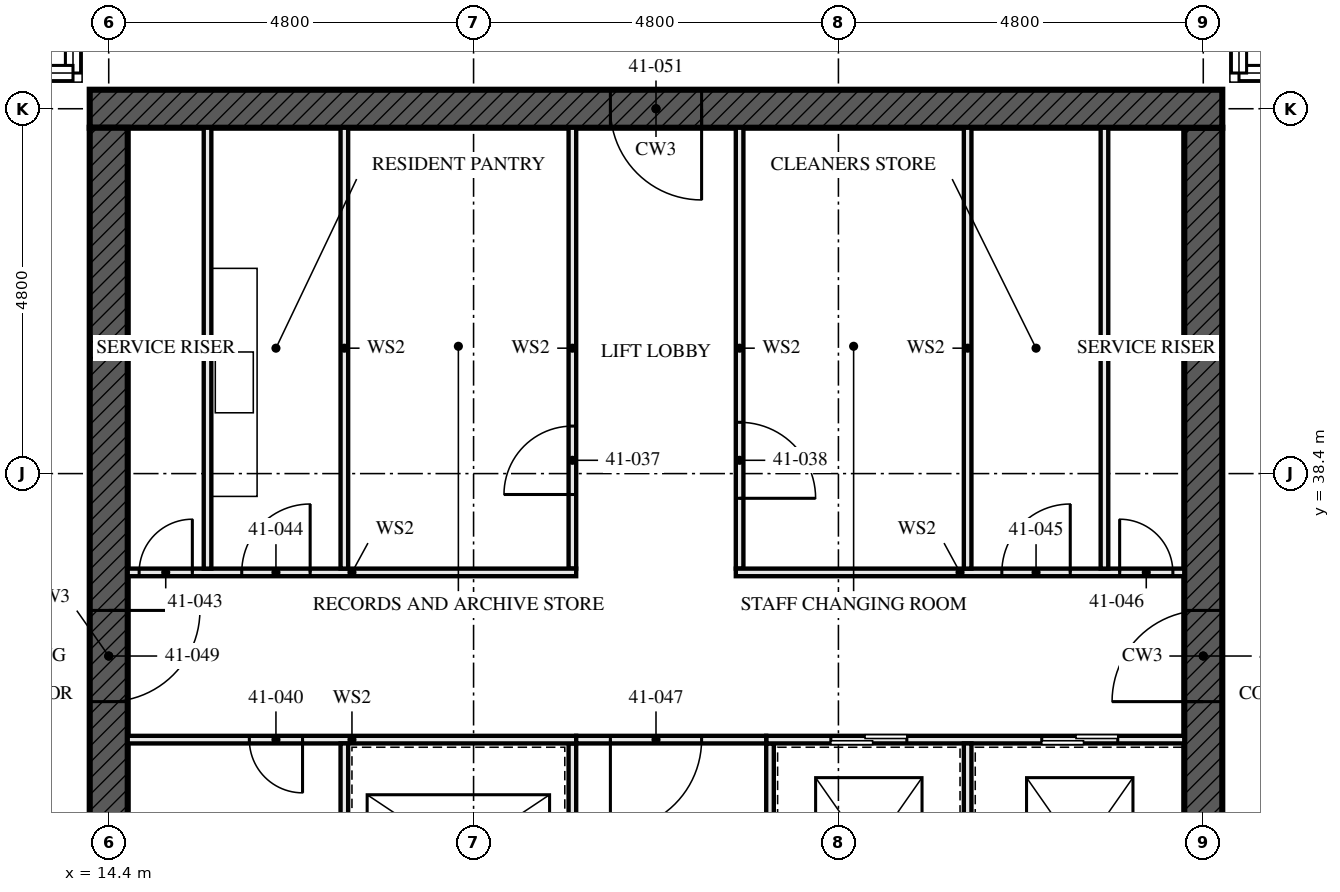
"""IFC4 building model, lengths in metres.
Left out: names, types, materials, properties, quantities, classifications, styles, units other than length and angle.
Written with IfcOpenShell. Run it as: python <this file> out.ifc"""

import sys

from ifc_helpers import new_model, si_unit, direction, frame, frame_2d, origin, place, context, subcontext, project, spatial, rectangle, extrude, element, fill, save


model = new_model("IFC4")
c1 = context("Model", 3, precision=1e-05, world=origin(), true_north=direction((0.0, 1.0)))
c2 = subcontext(c1, "Body", "Model", "MODEL_VIEW")
j1 = project(units=[si_unit("LENGTHUNIT", "METRE"), si_unit("PLANEANGLEUNIT", "RADIAN")], contexts=[c1])
p1 = place(None, origin())
s1 = spatial("IfcSite", under=j1, at=p1, CompositionType="ELEMENT")
p2 = place(p1, origin())
s2 = spatial("IfcBuilding", under=s1, at=p2, CompositionType="ELEMENT")
p3 = place(p2, frame((0.0, 0.0, 151.5)))
s3 = spatial("IfcBuildingStorey", under=s2, at=p3, CompositionType="ELEMENT", Elevation=151.5)
p4 = place(p3, frame((29.05, 43.2, -0.17), z_axis=(0.0, 0.0, 1.0), x_axis=(-1.0, 0.0, 0.0)))
e1 = element("IfcWall", 1, at=p4, inside=s3, PredefinedType="SHEAR", context=c2, shape_type="SweptSolid", body=[
    extrude(rectangle(XDim=14.9, YDim=0.5, at=frame_2d((7.45, 0.0))), origin(), (0.0, 0.0, 1.0), 3.5),
])
p5 = place(p4, frame((6.85, 0.0, 0.17)))
e2 = element("IfcOpeningElement", 2, at=p5, cuts=e1, PredefinedType="OPENING", context=c2, shape_type="SweptSolid", body=[
    extrude(rectangle(XDim=1.2, YDim=2.1, at=frame_2d((0.6, 1.05))), frame((0.0, 0.26, 0.0), z_axis=(0.0, -1.0, 0.0), x_axis=(1.0, 0.0, 0.0)), (0.0, 0.0, 1.0), 0.521),
])
p6 = place(p3, frame((14.4, 42.95, -0.17), z_axis=(0.0, 0.0, 1.0), x_axis=(0.0, -1.0, 0.0)))
e3 = element("IfcWall", 3, at=p6, inside=s3, PredefinedType="SHEAR", context=c2, shape_type="SweptSolid", body=[
    extrude(rectangle(XDim=13.9, YDim=0.5, at=frame_2d((6.95, 0.0))), origin(), (0.0, 0.0, 1.0), 3.5),
])
p7 = place(p6, frame((6.35, 0.0, 0.17)))
e4 = element("IfcOpeningElement", 4, at=p7, cuts=e3, PredefinedType="OPENING", context=c2, shape_type="SweptSolid", body=[
    extrude(rectangle(XDim=1.2, YDim=2.1, at=frame_2d((0.6, 1.05))), frame((0.0, 0.26, 0.0), z_axis=(0.0, -1.0, 0.0), x_axis=(1.0, 0.0, 0.0)), (0.0, 0.0, 1.0), 0.521),
])
p8 = place(p3, frame((28.8, 29.05, -0.17), z_axis=(0.0, 0.0, 1.0), x_axis=(0.0, 1.0, 0.0)))
e5 = element("IfcWall", 5, at=p8, inside=s3, PredefinedType="SHEAR", context=c2, shape_type="SweptSolid", body=[
    extrude(rectangle(XDim=13.9, YDim=0.5, at=frame_2d((6.95, 0.0))), origin(), (0.0, 0.0, 1.0), 3.5),
])
p9 = place(p8, frame((6.35, 0.0, 0.17)))
e6 = element("IfcOpeningElement", 6, at=p9, cuts=e5, PredefinedType="OPENING", context=c2, shape_type="SweptSolid", body=[
    extrude(rectangle(XDim=1.2, YDim=2.1, at=frame_2d((0.6, 1.05))), frame((0.0, 0.26, 0.0), z_axis=(0.0, -1.0, 0.0), x_axis=(1.0, 0.0, 0.0)), (0.0, 0.0, 1.0), 0.521),
])
for number, where, z_axis, x_axis in (
    (7, (15.7, 37.15, 0.0), (0.0, 0.0, 1.0), (0.0, 1.0, 0.0)),
    (8, (27.5, 37.15, 0.0), (0.0, 0.0, 1.0), (0.0, 1.0, 0.0)),
):
    element("IfcWall", number, at=place(p3, frame(where, z_axis=z_axis, x_axis=x_axis)), inside=s3, PredefinedType="SOLIDWALL", context=c2, shape_type="SweptSolid", body=[
        extrude(rectangle(XDim=5.8, YDim=0.1, at=frame_2d((2.9, 0.0))), origin(), (0.0, 0.0, 1.0), 3.33),
    ])
p10 = place(p3, frame((20.5, 29.05, 0.0), z_axis=(0.0, 0.0, 1.0), x_axis=(0.0, 1.0, 0.0)))
e9 = element("IfcWall", 9, at=p10, inside=s3, PredefinedType="SOLIDWALL", context=c2, shape_type="SweptSolid", body=[
    extrude(rectangle(XDim=5.8, YDim=0.1, at=frame_2d((2.9, 0.0))), origin(), (0.0, 0.0, 1.0), 3.33),
])
p11 = place(p10, frame((0.8, 0.0, 0.0)))
e10 = element("IfcOpeningElement", 10, at=p11, cuts=e9, PredefinedType="OPENING", context=c2, shape_type="SweptSolid", body=[
    extrude(rectangle(XDim=1.1, YDim=2.3, at=frame_2d((0.55, 1.15))), frame((0.0, 0.061, 0.0), z_axis=(0.0, -1.0, 0.0), x_axis=(1.0, 0.0, 0.0)), (0.0, 0.0, 1.0), 0.121),
])
p12 = place(p10, frame((3.775, 0.0, 0.0)))
e11 = element("IfcOpeningElement", 11, at=p12, cuts=e9, PredefinedType="OPENING", context=c2, shape_type="SweptSolid", body=[
    extrude(rectangle(XDim=1.1, YDim=2.3, at=frame_2d((0.55, 1.15))), frame((0.0, 0.061, 0.0), z_axis=(0.0, -1.0, 0.0), x_axis=(1.0, 0.0, 0.0)), (0.0, 0.0, 1.0), 0.121),
])
p13 = place(p3, frame((20.5, 37.15, 0.0), z_axis=(0.0, 0.0, 1.0), x_axis=(0.0, 1.0, 0.0)))
e12 = element("IfcWall", 12, at=p13, inside=s3, PredefinedType="SOLIDWALL", context=c2, shape_type="SweptSolid", body=[
    extrude(rectangle(XDim=5.8, YDim=0.1, at=frame_2d((2.9, 0.0))), origin(), (0.0, 0.0, 1.0), 3.33),
])
p14 = place(p13, frame((0.975, 0.0, 0.0)))
e13 = element("IfcOpeningElement", 13, at=p14, cuts=e12, PredefinedType="OPENING", context=c2, shape_type="SweptSolid", body=[
    extrude(rectangle(XDim=0.9, YDim=2.1, at=frame_2d((0.45, 1.05))), frame((0.0, 0.061, 0.0), z_axis=(0.0, -1.0, 0.0), x_axis=(1.0, 0.0, 0.0)), (0.0, 0.0, 1.0), 0.121),
])
p15 = place(p3, frame((22.7, 37.15, 0.0), z_axis=(0.0, 0.0, 1.0), x_axis=(0.0, 1.0, 0.0)))
e14 = element("IfcWall", 14, at=p15, inside=s3, PredefinedType="SOLIDWALL", context=c2, shape_type="SweptSolid", body=[
    extrude(rectangle(XDim=5.8, YDim=0.1, at=frame_2d((2.9, 0.0))), origin(), (0.0, 0.0, 1.0), 3.33),
])
p16 = place(p15, frame((0.925, 0.0, 0.0)))
e15 = element("IfcOpeningElement", 15, at=p16, cuts=e14, PredefinedType="OPENING", context=c2, shape_type="SweptSolid", body=[
    extrude(rectangle(XDim=1.0, YDim=2.1, at=frame_2d((0.5, 1.05))), frame((0.0, 0.061, 0.0), z_axis=(0.0, -1.0, 0.0), x_axis=(1.0, 0.0, 0.0)), (0.0, 0.0, 1.0), 0.121),
])
p17 = place(p3, frame((23.1, 29.05, 0.0), z_axis=(0.0, 0.0, 1.0), x_axis=(0.0, 1.0, 0.0)))
e16 = element("IfcWall", 16, at=p17, inside=s3, PredefinedType="SOLIDWALL", context=c2, shape_type="SweptSolid", body=[
    extrude(rectangle(XDim=5.8, YDim=0.1, at=frame_2d((2.9, 0.0))), origin(), (0.0, 0.0, 1.0), 3.33),
])
p18 = place(p17, frame((1.0, 0.0, 0.0)))
e17 = element("IfcOpeningElement", 17, at=p18, cuts=e16, PredefinedType="OPENING", context=c2, shape_type="SweptSolid", body=[
    extrude(rectangle(XDim=0.7, YDim=2.1, at=frame_2d((0.35, 1.05))), frame((0.0, 0.061, 0.0), z_axis=(0.0, -1.0, 0.0), x_axis=(1.0, 0.0, 0.0)), (0.0, 0.0, 1.0), 0.121),
])
p19 = place(p3, frame((14.65, 34.9, 0.0), z_axis=(0.0, 0.0, 1.0), x_axis=(1.0, 0.0, 0.0)))
e18 = element("IfcWall", 18, at=p19, inside=s3, PredefinedType="SOLIDWALL", context=c2, shape_type="SweptSolid", body=[
    extrude(rectangle(XDim=5.9, YDim=0.1, at=frame_2d((2.95, 0.0))), origin(), (0.0, 0.0, 1.0), 3.33),
])
p20 = place(p19, frame((1.6, 0.0, 0.0)))
e19 = element("IfcOpeningElement", 19, at=p20, cuts=e18, PredefinedType="OPENING", context=c2, shape_type="SweptSolid", body=[
    extrude(rectangle(XDim=0.7, YDim=2.1, at=frame_2d((0.35, 1.05))), frame((0.0, 0.061, 0.0), z_axis=(0.0, -1.0, 0.0), x_axis=(1.0, 0.0, 0.0)), (0.0, 0.0, 1.0), 0.121),
])
p21 = place(p3, frame((23.05, 34.9, 0.0), z_axis=(0.0, 0.0, 1.0), x_axis=(1.0, 0.0, 0.0)))
e20 = element("IfcWall", 20, at=p21, inside=s3, PredefinedType="SOLIDWALL", context=c2, shape_type="SweptSolid", body=[
    extrude(rectangle(XDim=5.5, YDim=0.1, at=frame_2d((2.75, 0.0))), origin(), (0.0, 0.0, 1.0), 3.33),
])
p22 = place(p21, frame((0.85, 0.0, 0.0)))
e21 = element("IfcOpeningElement", 21, at=p22, cuts=e20, PredefinedType="OPENING", context=c2, shape_type="SweptSolid", body=[
    extrude(rectangle(XDim=1.0, YDim=2.1, at=frame_2d((0.5, 1.05))), frame((0.0, 0.061, 0.0), z_axis=(0.0, -1.0, 0.0), x_axis=(1.0, 0.0, 0.0)), (0.0, 0.0, 1.0), 0.121),
])
p23 = place(p21, frame((3.625, 0.0, 0.0)))
e22 = element("IfcOpeningElement", 22, at=p23, cuts=e20, PredefinedType="OPENING", context=c2, shape_type="SweptSolid", body=[
    extrude(rectangle(XDim=1.0, YDim=2.1, at=frame_2d((0.5, 1.05))), frame((0.0, 0.061, 0.0), z_axis=(0.0, -1.0, 0.0), x_axis=(1.0, 0.0, 0.0)), (0.0, 0.0, 1.0), 0.121),
])
p24 = place(p3, frame((14.65, 37.1, 0.0), z_axis=(0.0, 0.0, 1.0), x_axis=(1.0, 0.0, 0.0)))
e23 = element("IfcWall", 23, at=p24, inside=s3, PredefinedType="SOLIDWALL", context=c2, shape_type="SweptSolid", body=[
    extrude(rectangle(XDim=5.9, YDim=0.1, at=frame_2d((2.95, 0.0))), origin(), (0.0, 0.0, 1.0), 3.33),
])
p25 = place(p24, frame((0.15, 0.0, 0.0)))
e24 = element("IfcOpeningElement", 24, at=p25, cuts=e23, PredefinedType="OPENING", context=c2, shape_type="SweptSolid", body=[
    extrude(rectangle(XDim=0.7, YDim=2.1, at=frame_2d((0.35, 1.05))), frame((0.0, 0.061, 0.0), z_axis=(0.0, -1.0, 0.0), x_axis=(1.0, 0.0, 0.0)), (0.0, 0.0, 1.0), 0.121),
])
p26 = place(p24, frame((1.5, 0.0, 0.0)))
e25 = element("IfcOpeningElement", 25, at=p26, cuts=e23, PredefinedType="OPENING", context=c2, shape_type="SweptSolid", body=[
    extrude(rectangle(XDim=0.9, YDim=2.1, at=frame_2d((0.45, 1.05))), frame((0.0, 0.061, 0.0), z_axis=(0.0, -1.0, 0.0), x_axis=(1.0, 0.0, 0.0)), (0.0, 0.0, 1.0), 0.121),
])
p27 = place(p3, frame((22.65, 37.1, 0.0), z_axis=(0.0, 0.0, 1.0), x_axis=(1.0, 0.0, 0.0)))
e26 = element("IfcWall", 26, at=p27, inside=s3, PredefinedType="SOLIDWALL", context=c2, shape_type="SweptSolid", body=[
    extrude(rectangle(XDim=5.9, YDim=0.1, at=frame_2d((2.95, 0.0))), origin(), (0.0, 0.0, 1.0), 3.33),
])
p28 = place(p27, frame((3.5, 0.0, 0.0)))
e27 = element("IfcOpeningElement", 27, at=p28, cuts=e26, PredefinedType="OPENING", context=c2, shape_type="SweptSolid", body=[
    extrude(rectangle(XDim=0.9, YDim=2.1, at=frame_2d((0.45, 1.05))), frame((0.0, 0.061, 0.0), z_axis=(0.0, -1.0, 0.0), x_axis=(1.0, 0.0, 0.0)), (0.0, 0.0, 1.0), 0.121),
])
p29 = place(p27, frame((5.05, 0.0, 0.0)))
e28 = element("IfcOpeningElement", 28, at=p29, cuts=e26, PredefinedType="OPENING", context=c2, shape_type="SweptSolid", body=[
    extrude(rectangle(XDim=0.7, YDim=2.1, at=frame_2d((0.35, 1.05))), frame((0.0, 0.061, 0.0), z_axis=(0.0, -1.0, 0.0), x_axis=(1.0, 0.0, 0.0)), (0.0, 0.0, 1.0), 0.121),
])
p30 = place(p3, frame((20.55, 34.9, 0.0), z_axis=(0.0, 0.0, 1.0), x_axis=(1.0, 0.0, 0.0)))
e29 = element("IfcWall", 29, at=p30, inside=s3, PredefinedType="SOLIDWALL", context=c2, shape_type="SweptSolid", body=[
    extrude(rectangle(XDim=2.5, YDim=0.1, at=frame_2d((1.25, 0.0))), origin(), (0.0, 0.0, 1.0), 3.33),
])
p31 = place(p30, frame((0.45, 0.0, 0.0)))
e30 = element("IfcOpeningElement", 30, at=p31, cuts=e29, PredefinedType="OPENING", context=c2, shape_type="SweptSolid", body=[
    extrude(rectangle(XDim=1.2, YDim=2.1, at=frame_2d((0.6, 1.05))), frame((0.0, 0.061, 0.0), z_axis=(0.0, -1.0, 0.0), x_axis=(1.0, 0.0, 0.0)), (0.0, 0.0, 1.0), 0.121),
])
for number, where, z_axis, x_axis in (
    (31, (17.5, 29.05, 0.0), (0.0, 0.0, 1.0), (0.0, 1.0, 0.0)),
    (32, (17.5, 37.15, 0.0), (0.0, 0.0, 1.0), (0.0, 1.0, 0.0)),
    (33, (25.7, 37.15, 0.0), (0.0, 0.0, 1.0), (0.0, 1.0, 0.0)),
):
    element("IfcWall", number, at=place(p3, frame(where, z_axis=z_axis, x_axis=x_axis)), inside=s3, PredefinedType="SOLIDWALL", context=c2, shape_type="SweptSolid", body=[
        extrude(rectangle(XDim=5.8, YDim=0.1, at=frame_2d((2.9, 0.0))), origin(), (0.0, 0.0, 1.0), 3.33),
    ])
p32 = place(p3, frame((25.7, 31.95, 0.0), z_axis=(0.0, 0.0, 1.0), x_axis=(0.0, 1.0, 0.0)))
e34 = element("IfcWall", 34, at=p32, inside=s3, PredefinedType="SOLIDWALL", context=c2, shape_type="SweptSolid", body=[
    extrude(rectangle(XDim=2.9, YDim=0.1, at=frame_2d((1.45, 0.0))), origin(), (0.0, 0.0, 1.0), 3.33),
])
p33 = place(p14, origin())
e35 = element("IfcDoor", 35, at=p33, inside=s3, OperationType="SINGLE_SWING_RIGHT", PredefinedType="DOOR", context=c2, shape_type="SweptSolid", body=[
    extrude(rectangle(XDim=0.9, YDim=2.1, at=frame_2d((0.45, 1.05))), frame((0.0, 0.027, 0.0), z_axis=(0.0, -1.0, 0.0), x_axis=(1.0, 0.0, 0.0)), (0.0, 0.0, 1.0), 0.054),
])
fill(e13, e35)
p34 = place(p16, frame((1.0, 0.0, 0.0), z_axis=(0.0, 0.0, 1.0), x_axis=(-1.0, 0.0, 0.0)))
e36 = element("IfcDoor", 36, at=p34, inside=s3, OperationType="SINGLE_SWING_LEFT", PredefinedType="DOOR", context=c2, shape_type="SweptSolid", body=[
    extrude(rectangle(XDim=1.0, YDim=2.1, at=frame_2d((0.5, 1.05))), frame((0.0, 0.027, 0.0), z_axis=(0.0, -1.0, 0.0), x_axis=(1.0, 0.0, 0.0)), (0.0, 0.0, 1.0), 0.054),
])
fill(e15, e36)
p35 = place(p20, frame((0.7, 0.0, 0.0), z_axis=(0.0, 0.0, 1.0), x_axis=(-1.0, 0.0, 0.0)))
e37 = element("IfcDoor", 37, at=p35, inside=s3, OperationType="SINGLE_SWING_RIGHT", PredefinedType="DOOR", context=c2, shape_type="SweptSolid", body=[
    extrude(rectangle(XDim=0.7, YDim=2.1, at=frame_2d((0.35, 1.05))), frame((0.0, 0.027, 0.0), z_axis=(0.0, -1.0, 0.0), x_axis=(1.0, 0.0, 0.0)), (0.0, 0.0, 1.0), 0.054),
])
fill(e19, e37)
p36 = place(p22, origin())
e38 = element("IfcDoor", 38, at=p36, inside=s3, OperationType="SLIDING_TO_LEFT", PredefinedType="DOOR", context=c2, shape_type="SweptSolid", body=[
    extrude(rectangle(XDim=1.0, YDim=2.1, at=frame_2d((0.5, 1.05))), frame((0.0, 0.05, 0.0), z_axis=(0.0, -1.0, 0.0), x_axis=(1.0, 0.0, 0.0)), (0.0, 0.0, 1.0), 0.1),
])
fill(e21, e38)
p37 = place(p23, origin())
e39 = element("IfcDoor", 39, at=p37, inside=s3, OperationType="SLIDING_TO_LEFT", PredefinedType="DOOR", context=c2, shape_type="SweptSolid", body=[
    extrude(rectangle(XDim=1.0, YDim=2.1, at=frame_2d((0.5, 1.05))), frame((0.0, 0.05, 0.0), z_axis=(0.0, -1.0, 0.0), x_axis=(1.0, 0.0, 0.0)), (0.0, 0.0, 1.0), 0.1),
])
fill(e22, e39)
p38 = place(p25, origin())
e40 = element("IfcDoor", 40, at=p38, inside=s3, OperationType="SINGLE_SWING_LEFT", PredefinedType="DOOR", context=c2, shape_type="SweptSolid", body=[
    extrude(rectangle(XDim=0.7, YDim=2.1, at=frame_2d((0.35, 1.05))), frame((0.0, 0.027, 0.0), z_axis=(0.0, -1.0, 0.0), x_axis=(1.0, 0.0, 0.0)), (0.0, 0.0, 1.0), 0.054),
])
fill(e24, e40)
p39 = place(p26, origin())
e41 = element("IfcDoor", 41, at=p39, inside=s3, OperationType="SINGLE_SWING_LEFT", PredefinedType="DOOR", context=c2, shape_type="SweptSolid", body=[
    extrude(rectangle(XDim=0.9, YDim=2.1, at=frame_2d((0.45, 1.05))), frame((0.0, 0.027, 0.0), z_axis=(0.0, -1.0, 0.0), x_axis=(1.0, 0.0, 0.0)), (0.0, 0.0, 1.0), 0.054),
])
fill(e25, e41)
p40 = place(p28, origin())
e42 = element("IfcDoor", 42, at=p40, inside=s3, OperationType="SINGLE_SWING_LEFT", PredefinedType="DOOR", context=c2, shape_type="SweptSolid", body=[
    extrude(rectangle(XDim=0.9, YDim=2.1, at=frame_2d((0.45, 1.05))), frame((0.0, 0.027, 0.0), z_axis=(0.0, -1.0, 0.0), x_axis=(1.0, 0.0, 0.0)), (0.0, 0.0, 1.0), 0.054),
])
fill(e27, e42)
p41 = place(p29, origin())
e43 = element("IfcDoor", 43, at=p41, inside=s3, OperationType="SINGLE_SWING_RIGHT", PredefinedType="DOOR", context=c2, shape_type="SweptSolid", body=[
    extrude(rectangle(XDim=0.7, YDim=2.1, at=frame_2d((0.35, 1.05))), frame((0.0, 0.027, 0.0), z_axis=(0.0, -1.0, 0.0), x_axis=(1.0, 0.0, 0.0)), (0.0, 0.0, 1.0), 0.054),
])
fill(e28, e43)
p42 = place(p31, frame((1.2, 0.0, 0.0), z_axis=(0.0, 0.0, 1.0), x_axis=(-1.0, 0.0, 0.0)))
e44 = element("IfcDoor", 44, at=p42, inside=s3, OperationType="SINGLE_SWING_LEFT", PredefinedType="DOOR", context=c2, shape_type="SweptSolid", body=[
    extrude(rectangle(XDim=1.2, YDim=2.1, at=frame_2d((0.6, 1.05))), frame((0.0, 0.027, 0.0), z_axis=(0.0, -1.0, 0.0), x_axis=(1.0, 0.0, 0.0)), (0.0, 0.0, 1.0), 0.054),
])
fill(e30, e44)
p43 = place(p7, origin())
e45 = element("IfcDoor", 45, at=p43, inside=s3, OperationType="SINGLE_SWING_LEFT", PredefinedType="DOOR", context=c2, shape_type="SweptSolid", body=[
    extrude(rectangle(XDim=1.2, YDim=2.1, at=frame_2d((0.6, 1.05))), frame((0.0, 0.027, 0.0), z_axis=(0.0, -1.0, 0.0), x_axis=(1.0, 0.0, 0.0)), (0.0, 0.0, 1.0), 0.054),
])
fill(e4, e45)
p44 = place(p9, origin())
e46 = element("IfcDoor", 46, at=p44, inside=s3, OperationType="SINGLE_SWING_LEFT", PredefinedType="DOOR", context=c2, shape_type="SweptSolid", body=[
    extrude(rectangle(XDim=1.2, YDim=2.1, at=frame_2d((0.6, 1.05))), frame((0.0, 0.027, 0.0), z_axis=(0.0, -1.0, 0.0), x_axis=(1.0, 0.0, 0.0)), (0.0, 0.0, 1.0), 0.054),
])
fill(e6, e46)
p45 = place(p5, origin())
e47 = element("IfcDoor", 47, at=p45, inside=s3, OperationType="SINGLE_SWING_LEFT", PredefinedType="DOOR", context=c2, shape_type="SweptSolid", body=[
    extrude(rectangle(XDim=1.2, YDim=2.1, at=frame_2d((0.6, 1.05))), frame((0.0, 0.027, 0.0), z_axis=(0.0, -1.0, 0.0), x_axis=(1.0, 0.0, 0.0)), (0.0, 0.0, 1.0), 0.054),
])
fill(e2, e47)
save(model, sys.argv[1])
